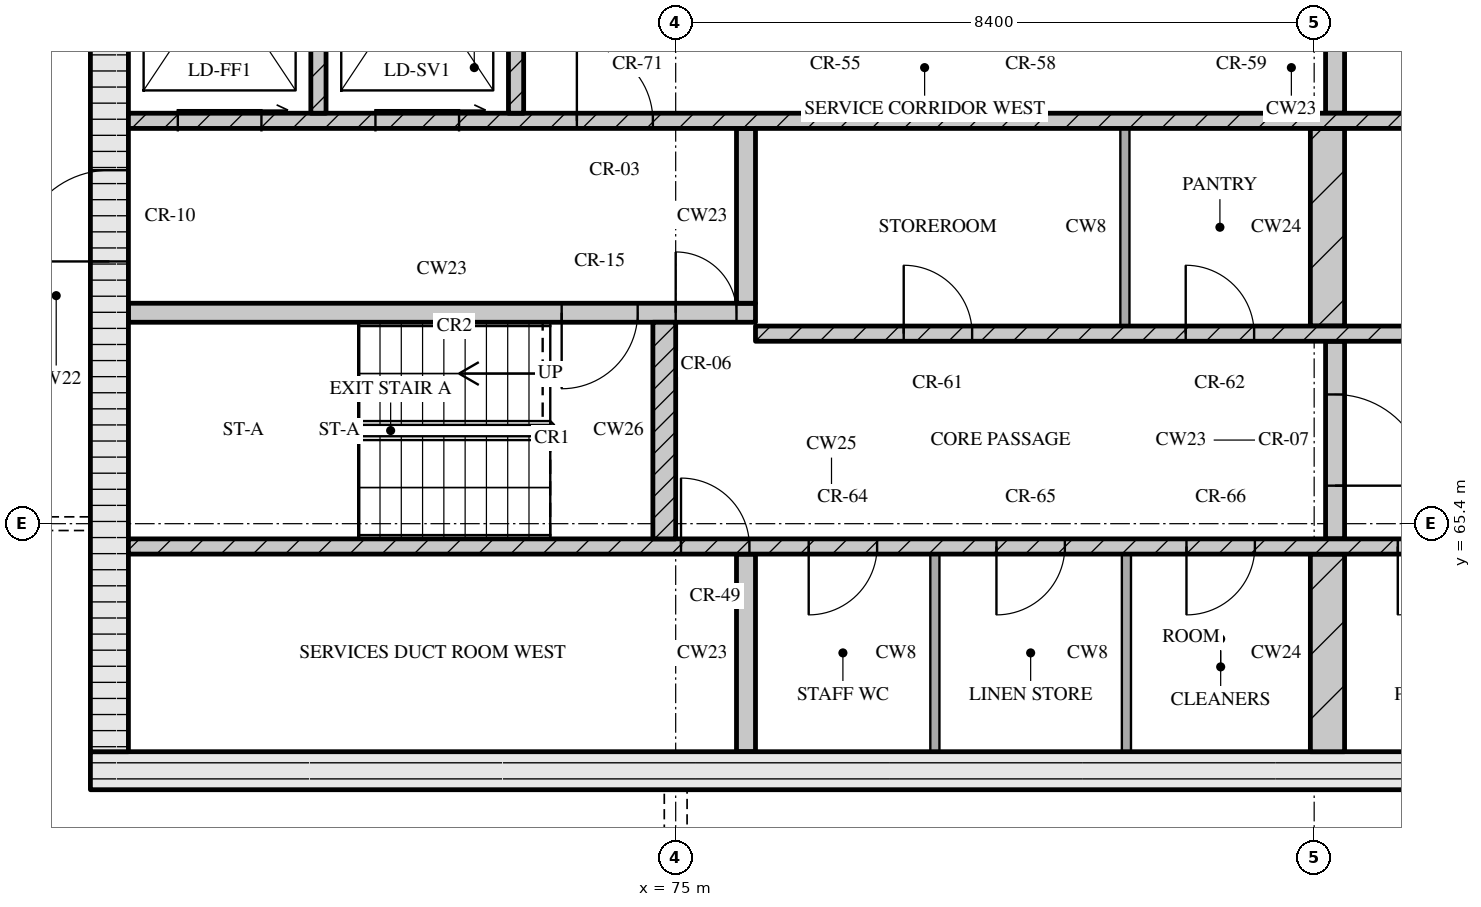
"""IFC4 building model, lengths in metres.
Left out: names, types, materials, properties, quantities, classifications, styles, units other than length and angle.
Written with IfcOpenShell. Run it as: python <this file> out.ifc"""

import sys

from ifc_helpers import new_model, si_unit, direction, frame, frame_2d, origin, place, context, subcontext, project, spatial, rectangle, extrude, element, fill, save


model = new_model("IFC4")
c1 = context("Model", 3, precision=1e-05, world=origin(), true_north=direction((0.0, 1.0)))
c2 = subcontext(c1, "Body", "Model", "MODEL_VIEW")
j1 = project(units=[si_unit("LENGTHUNIT", "METRE"), si_unit("PLANEANGLEUNIT", "RADIAN")], contexts=[c1])
p1 = place(None, origin())
s1 = spatial("IfcSite", under=j1, at=p1, CompositionType="ELEMENT")
p2 = place(p1, origin())
s2 = spatial("IfcBuilding", under=s1, at=p2, CompositionType="ELEMENT")
p3 = place(p2, frame((0.0, 0.0, 288.75)))
s3 = spatial("IfcBuildingStorey", under=s2, at=p3, CompositionType="ELEMENT", Elevation=288.75)
p4 = place(p3, frame((67.3, 62.15, 0.0), z_axis=(0.0, 0.0, 1.0), x_axis=(1.0, 0.0, 0.0)))
e1 = element("IfcWall", 1, at=p4, inside=s3, PredefinedType="SOLIDWALL", context=c2, shape_type="SweptSolid", body=[
    extrude(rectangle(XDim=40.6, YDim=0.5, at=frame_2d((20.3, 0.0))), origin(), (0.0, 0.0, 1.0), 3.32),
])
p5 = place(p4, frame((20.65, 0.0, 0.0)))
e2 = element("IfcOpeningElement", 2, at=p5, cuts=e1, PredefinedType="OPENING", context=c2, shape_type="SweptSolid", body=[
    extrude(rectangle(XDim=1.8, YDim=2.1, at=frame_2d((0.9, 1.05))), frame((0.0, 0.26, 0.0), z_axis=(0.0, -1.0, 0.0), x_axis=(1.0, 0.0, 0.0)), (0.0, 0.0, 1.0), 0.52),
])
p6 = place(p3, frame((67.55, 62.4, 0.0), z_axis=(0.0, 0.0, 1.0), x_axis=(0.0, 1.0, 0.0)))
e3 = element("IfcWall", 3, at=p6, inside=s3, PredefinedType="SOLIDWALL", context=c2, shape_type="SweptSolid", body=[
    extrude(rectangle(XDim=12.0, YDim=0.5, at=frame_2d((6.0, 0.0))), origin(), (0.0, 0.0, 1.0), 3.32),
])
p7 = place(p6, frame((6.45, 0.0, 0.0)))
e4 = element("IfcOpeningElement", 4, at=p7, cuts=e3, PredefinedType="OPENING", context=c2, shape_type="SweptSolid", body=[
    extrude(rectangle(XDim=1.2, YDim=2.1, at=frame_2d((0.6, 1.05))), frame((0.0, 0.26, 0.0), z_axis=(0.0, -1.0, 0.0), x_axis=(1.0, 0.0, 0.0)), (0.0, 0.0, 1.0), 0.52),
])
p8 = place(p3, frame((75.925, 62.4, 0.0), z_axis=(0.0, 0.0, 1.0), x_axis=(0.0, 1.0, 0.0)))
e5 = element("IfcWall", 5, at=p8, inside=s3, PredefinedType="SOLIDWALL", context=c2, shape_type="SweptSolid", body=[
    extrude(rectangle(XDim=2.6, YDim=0.25, at=frame_2d((1.3, 0.0))), origin(), (0.0, 0.0, 1.0), 3.32),
])
for number, where, z_axis, x_axis in (
    (6, (78.41, 62.4, 0.0), (0.0, 0.0, 1.0), (0.0, 1.0, 0.0)),
    (7, (80.93, 62.4, 0.0), (0.0, 0.0, 1.0), (0.0, 1.0, 0.0)),
):
    element("IfcWall", number, at=place(p3, frame(where, z_axis=z_axis, x_axis=x_axis)), inside=s3, PredefinedType="PARTITIONING", context=c2, shape_type="SweptSolid", body=[
        extrude(rectangle(XDim=2.6, YDim=0.12, at=frame_2d((1.3, 0.0))), origin(), (0.0, 0.0, 1.0), 3.32),
    ])
p9 = place(p3, frame((83.575, 62.4, 0.0), z_axis=(0.0, 0.0, 1.0), x_axis=(0.0, 1.0, 0.0)))
e8 = element("IfcWall", 8, at=p9, inside=s3, PredefinedType="SOLIDWALL", context=c2, shape_type="SweptSolid", body=[
    extrude(rectangle(XDim=2.6, YDim=0.45, at=frame_2d((1.3, 0.0))), origin(), (0.0, 0.0, 1.0), 3.32),
])
p10 = place(p3, frame((67.8, 65.1, 0.0), z_axis=(0.0, 0.0, 1.0), x_axis=(1.0, 0.0, 0.0)))
e9 = element("IfcWall", 9, at=p10, inside=s3, PredefinedType="SOLIDWALL", context=c2, shape_type="SweptSolid", body=[
    extrude(rectangle(XDim=18.5, YDim=0.2, at=frame_2d((9.25, 0.0))), origin(), (0.0, 0.0, 1.0), 3.32),
])
p11 = place(p10, frame((7.27, 0.0, 0.0)))
e10 = element("IfcOpeningElement", 10, at=p11, cuts=e9, PredefinedType="OPENING", context=c2, shape_type="SweptSolid", body=[
    extrude(rectangle(XDim=0.9, YDim=2.1, at=frame_2d((0.45, 1.05))), frame((0.0, 0.11, 0.0), z_axis=(0.0, -1.0, 0.0), x_axis=(1.0, 0.0, 0.0)), (0.0, 0.0, 1.0), 0.22),
])
p12 = place(p10, frame((8.95, 0.0, 0.0)))
e11 = element("IfcOpeningElement", 11, at=p12, cuts=e9, PredefinedType="OPENING", context=c2, shape_type="SweptSolid", body=[
    extrude(rectangle(XDim=0.9, YDim=2.1, at=frame_2d((0.45, 1.05))), frame((0.0, 0.11, 0.0), z_axis=(0.0, -1.0, 0.0), x_axis=(1.0, 0.0, 0.0)), (0.0, 0.0, 1.0), 0.22),
])
p13 = place(p10, frame((11.42, 0.0, 0.0)))
e12 = element("IfcOpeningElement", 12, at=p13, cuts=e9, PredefinedType="OPENING", context=c2, shape_type="SweptSolid", body=[
    extrude(rectangle(XDim=0.9, YDim=2.1, at=frame_2d((0.45, 1.05))), frame((0.0, 0.11, 0.0), z_axis=(0.0, -1.0, 0.0), x_axis=(1.0, 0.0, 0.0)), (0.0, 0.0, 1.0), 0.22),
])
p14 = place(p10, frame((13.92, 0.0, 0.0)))
e13 = element("IfcOpeningElement", 13, at=p14, cuts=e9, PredefinedType="OPENING", context=c2, shape_type="SweptSolid", body=[
    extrude(rectangle(XDim=0.9, YDim=2.1, at=frame_2d((0.45, 1.05))), frame((0.0, 0.11, 0.0), z_axis=(0.0, -1.0, 0.0), x_axis=(1.0, 0.0, 0.0)), (0.0, 0.0, 1.0), 0.22),
])
p15 = place(p10, frame((16.7, 0.0, 0.0)))
e14 = element("IfcOpeningElement", 14, at=p15, cuts=e9, PredefinedType="OPENING", context=c2, shape_type="SweptSolid", body=[
    extrude(rectangle(XDim=0.9, YDim=2.1, at=frame_2d((0.45, 1.05))), frame((0.0, 0.11, 0.0), z_axis=(0.0, -1.0, 0.0), x_axis=(1.0, 0.0, 0.0)), (0.0, 0.0, 1.0), 0.22),
])
p16 = place(p3, frame((74.85, 65.2, 0.0), z_axis=(0.0, 0.0, 1.0), x_axis=(0.0, 1.0, 0.0)))
e15 = element("IfcWall", 15, at=p16, inside=s3, PredefinedType="SOLIDWALL", context=c2, shape_type="SweptSolid", body=[
    extrude(rectangle(XDim=2.85, YDim=0.3, at=frame_2d((1.425, 0.0))), origin(), (0.0, 0.0, 1.0), 3.32),
])
p17 = place(p3, frame((83.675, 65.2, 0.0), z_axis=(0.0, 0.0, 1.0), x_axis=(0.0, 1.0, 0.0)))
e16 = element("IfcWall", 16, at=p17, inside=s3, PredefinedType="SOLIDWALL", context=c2, shape_type="SweptSolid", body=[
    extrude(rectangle(XDim=2.6, YDim=0.25, at=frame_2d((1.3, 0.0))), origin(), (0.0, 0.0, 1.0), 3.32),
])
p18 = place(p17, frame((0.7, 0.0, 0.0)))
e17 = element("IfcOpeningElement", 17, at=p18, cuts=e16, PredefinedType="OPENING", context=c2, shape_type="SweptSolid", body=[
    extrude(rectangle(XDim=1.2, YDim=2.1, at=frame_2d((0.6, 1.05))), frame((0.0, 0.135, 0.0), z_axis=(0.0, -1.0, 0.0), x_axis=(1.0, 0.0, 0.0)), (0.0, 0.0, 1.0), 0.27),
])
p19 = place(p3, frame((76.05, 67.9, 0.0), z_axis=(0.0, 0.0, 1.0), x_axis=(1.0, 0.0, 0.0)))
e18 = element("IfcWall", 18, at=p19, inside=s3, PredefinedType="SOLIDWALL", context=c2, shape_type="SweptSolid", body=[
    extrude(rectangle(XDim=23.1, YDim=0.2, at=frame_2d((11.55, 0.0))), origin(), (0.0, 0.0, 1.0), 3.32),
])
p20 = place(p19, frame((1.95, 0.0, 0.0)))
e19 = element("IfcOpeningElement", 19, at=p20, cuts=e18, PredefinedType="OPENING", context=c2, shape_type="SweptSolid", body=[
    extrude(rectangle(XDim=0.9, YDim=2.1, at=frame_2d((0.45, 1.05))), frame((0.0, 0.11, 0.0), z_axis=(0.0, -1.0, 0.0), x_axis=(1.0, 0.0, 0.0)), (0.0, 0.0, 1.0), 0.22),
])
p21 = place(p19, frame((5.66, 0.0, 0.0)))
e20 = element("IfcOpeningElement", 20, at=p21, cuts=e18, PredefinedType="OPENING", context=c2, shape_type="SweptSolid", body=[
    extrude(rectangle(XDim=0.9, YDim=2.1, at=frame_2d((0.45, 1.05))), frame((0.0, 0.11, 0.0), z_axis=(0.0, -1.0, 0.0), x_axis=(1.0, 0.0, 0.0)), (0.0, 0.0, 1.0), 0.22),
])
p22 = place(p19, frame((9.7, 0.0, 0.0)))
e21 = element("IfcOpeningElement", 21, at=p22, cuts=e18, PredefinedType="OPENING", context=c2, shape_type="SweptSolid", body=[
    extrude(rectangle(XDim=0.9, YDim=2.1, at=frame_2d((0.45, 1.05))), frame((0.0, 0.11, 0.0), z_axis=(0.0, -1.0, 0.0), x_axis=(1.0, 0.0, 0.0)), (0.0, 0.0, 1.0), 0.22),
])
p23 = place(p19, frame((13.55, 0.0, 0.0)))
e22 = element("IfcOpeningElement", 22, at=p23, cuts=e18, PredefinedType="OPENING", context=c2, shape_type="SweptSolid", body=[
    extrude(rectangle(XDim=1.0, YDim=2.1, at=frame_2d((0.5, 1.05))), frame((0.0, 0.11, 0.0), z_axis=(0.0, -1.0, 0.0), x_axis=(1.0, 0.0, 0.0)), (0.0, 0.0, 1.0), 0.22),
])
p24 = place(p19, frame((16.2, 0.0, 0.0)))
e23 = element("IfcOpeningElement", 23, at=p24, cuts=e18, PredefinedType="OPENING", context=c2, shape_type="SweptSolid", body=[
    extrude(rectangle(XDim=1.1, YDim=2.1, at=frame_2d((0.55, 1.05))), frame((0.0, 0.11, 0.0), z_axis=(0.0, -1.0, 0.0), x_axis=(1.0, 0.0, 0.0)), (0.0, 0.0, 1.0), 0.22),
])
p25 = place(p19, frame((18.7, 0.0, 0.0)))
e24 = element("IfcOpeningElement", 24, at=p25, cuts=e18, PredefinedType="OPENING", context=c2, shape_type="SweptSolid", body=[
    extrude(rectangle(XDim=1.1, YDim=2.1, at=frame_2d((0.55, 1.05))), frame((0.0, 0.11, 0.0), z_axis=(0.0, -1.0, 0.0), x_axis=(1.0, 0.0, 0.0)), (0.0, 0.0, 1.0), 0.22),
])
p26 = place(p19, frame((21.2, 0.0, 0.0)))
e25 = element("IfcOpeningElement", 25, at=p26, cuts=e18, PredefinedType="OPENING", context=c2, shape_type="SweptSolid", body=[
    extrude(rectangle(XDim=1.1, YDim=2.1, at=frame_2d((0.55, 1.05))), frame((0.0, 0.11, 0.0), z_axis=(0.0, -1.0, 0.0), x_axis=(1.0, 0.0, 0.0)), (0.0, 0.0, 1.0), 0.22),
])
p27 = place(p3, frame((80.91, 68.0, 0.0), z_axis=(0.0, 0.0, 1.0), x_axis=(0.0, 1.0, 0.0)))
e26 = element("IfcWall", 26, at=p27, inside=s3, PredefinedType="PARTITIONING", context=c2, shape_type="SweptSolid", body=[
    extrude(rectangle(XDim=2.6, YDim=0.12, at=frame_2d((1.3, 0.0))), origin(), (0.0, 0.0, 1.0), 3.32),
])
p28 = place(p3, frame((83.575, 68.0, 0.0), z_axis=(0.0, 0.0, 1.0), x_axis=(0.0, 1.0, 0.0)))
e27 = element("IfcWall", 27, at=p28, inside=s3, PredefinedType="SOLIDWALL", context=c2, shape_type="SweptSolid", body=[
    extrude(rectangle(XDim=2.6, YDim=0.45, at=frame_2d((1.3, 0.0))), origin(), (0.0, 0.0, 1.0), 3.32),
])
p29 = place(p3, frame((67.8, 68.175, 0.0), z_axis=(0.0, 0.0, 1.0), x_axis=(1.0, 0.0, 0.0)))
e28 = element("IfcWall", 28, at=p29, inside=s3, PredefinedType="SOLIDWALL", context=c2, shape_type="SweptSolid", body=[
    extrude(rectangle(XDim=8.25, YDim=0.25, at=frame_2d((4.125, 0.0))), origin(), (0.0, 0.0, 1.0), 3.32),
])
p30 = place(p29, frame((5.7, 0.0, 0.0)))
e29 = element("IfcOpeningElement", 29, at=p30, cuts=e28, PredefinedType="OPENING", context=c2, shape_type="SweptSolid", body=[
    extrude(rectangle(XDim=1.0, YDim=2.1, at=frame_2d((0.5, 1.05))), frame((0.0, 0.135, 0.0), z_axis=(0.0, -1.0, 0.0), x_axis=(1.0, 0.0, 0.0)), (0.0, 0.0, 1.0), 0.27),
])
p31 = place(p29, frame((7.2, 0.0, 0.0)))
e30 = element("IfcOpeningElement", 30, at=p31, cuts=e28, PredefinedType="OPENING", context=c2, shape_type="SweptSolid", body=[
    extrude(rectangle(XDim=0.8, YDim=2.1, at=frame_2d((0.4, 1.05))), frame((0.0, 0.135, 0.0), z_axis=(0.0, -1.0, 0.0), x_axis=(1.0, 0.0, 0.0)), (0.0, 0.0, 1.0), 0.27),
])
p32 = place(p3, frame((75.925, 68.3, 0.0), z_axis=(0.0, 0.0, 1.0), x_axis=(0.0, 1.0, 0.0)))
e31 = element("IfcWall", 31, at=p32, inside=s3, PredefinedType="SOLIDWALL", context=c2, shape_type="SweptSolid", body=[
    extrude(rectangle(XDim=2.3, YDim=0.25, at=frame_2d((1.15, 0.0))), origin(), (0.0, 0.0, 1.0), 3.32),
])
p33 = place(p3, frame((67.8, 70.7, 0.0), z_axis=(0.0, 0.0, 1.0), x_axis=(1.0, 0.0, 0.0)))
e32 = element("IfcWall", 32, at=p33, inside=s3, PredefinedType="SOLIDWALL", context=c2, shape_type="SweptSolid", body=[
    extrude(rectangle(XDim=39.6, YDim=0.2, at=frame_2d((19.8, 0.0))), origin(), (0.0, 0.0, 1.0), 3.32),
])
p34 = place(p33, frame((0.65, 0.0, 0.0)))
e33 = element("IfcOpeningElement", 33, at=p34, cuts=e32, PredefinedType="OPENING", context=c2, shape_type="SweptSolid", body=[
    extrude(rectangle(XDim=1.1, YDim=2.1, at=frame_2d((0.55, 1.05))), frame((0.0, 0.11, 0.0), z_axis=(0.0, -1.0, 0.0), x_axis=(1.0, 0.0, 0.0)), (0.0, 0.0, 1.0), 0.22),
])
p35 = place(p33, frame((3.25, 0.0, 0.0)))
e34 = element("IfcOpeningElement", 34, at=p35, cuts=e32, PredefinedType="OPENING", context=c2, shape_type="SweptSolid", body=[
    extrude(rectangle(XDim=1.1, YDim=2.1, at=frame_2d((0.55, 1.05))), frame((0.0, 0.11, 0.0), z_axis=(0.0, -1.0, 0.0), x_axis=(1.0, 0.0, 0.0)), (0.0, 0.0, 1.0), 0.22),
])
p36 = place(p33, frame((5.9, 0.0, 0.0)))
e35 = element("IfcOpeningElement", 35, at=p36, cuts=e32, PredefinedType="OPENING", context=c2, shape_type="SweptSolid", body=[
    extrude(rectangle(XDim=1.0, YDim=2.1, at=frame_2d((0.5, 1.05))), frame((0.0, 0.11, 0.0), z_axis=(0.0, -1.0, 0.0), x_axis=(1.0, 0.0, 0.0)), (0.0, 0.0, 1.0), 0.22),
])
p37 = place(p33, frame((21.7, 0.0, 0.0)))
e36 = element("IfcOpeningElement", 36, at=p37, cuts=e32, PredefinedType="OPENING", context=c2, shape_type="SweptSolid", body=[
    extrude(rectangle(XDim=1.0, YDim=2.1, at=frame_2d((0.5, 1.05))), frame((0.0, 0.11, 0.0), z_axis=(0.0, -1.0, 0.0), x_axis=(1.0, 0.0, 0.0)), (0.0, 0.0, 1.0), 0.22),
])
p38 = place(p33, frame((32.7, 0.0, 0.0)))
e37 = element("IfcOpeningElement", 37, at=p38, cuts=e32, PredefinedType="OPENING", context=c2, shape_type="SweptSolid", body=[
    extrude(rectangle(XDim=1.0, YDim=2.1, at=frame_2d((0.5, 1.05))), frame((0.0, 0.11, 0.0), z_axis=(0.0, -1.0, 0.0), x_axis=(1.0, 0.0, 0.0)), (0.0, 0.0, 1.0), 0.22),
])
p39 = place(p33, frame((35.25, 0.0, 0.0)))
e38 = element("IfcOpeningElement", 38, at=p39, cuts=e32, PredefinedType="OPENING", context=c2, shape_type="SweptSolid", body=[
    extrude(rectangle(XDim=1.1, YDim=2.1, at=frame_2d((0.55, 1.05))), frame((0.0, 0.11, 0.0), z_axis=(0.0, -1.0, 0.0), x_axis=(1.0, 0.0, 0.0)), (0.0, 0.0, 1.0), 0.22),
])
p40 = place(p33, frame((37.85, 0.0, 0.0)))
e39 = element("IfcOpeningElement", 39, at=p40, cuts=e32, PredefinedType="OPENING", context=c2, shape_type="SweptSolid", body=[
    extrude(rectangle(XDim=1.1, YDim=2.1, at=frame_2d((0.55, 1.05))), frame((0.0, 0.11, 0.0), z_axis=(0.0, -1.0, 0.0), x_axis=(1.0, 0.0, 0.0)), (0.0, 0.0, 1.0), 0.22),
])
p41 = place(p3, frame((70.3, 70.8, 0.0), z_axis=(0.0, 0.0, 1.0), x_axis=(0.0, 1.0, 0.0)))
e40 = element("IfcWall", 40, at=p41, inside=s3, PredefinedType="SOLIDWALL", context=c2, shape_type="SweptSolid", body=[
    extrude(rectangle(XDim=3.6, YDim=0.2, at=frame_2d((1.8, 0.0))), origin(), (0.0, 0.0, 1.0), 3.32),
])
p42 = place(p3, frame((72.9, 70.8, 0.0), z_axis=(0.0, 0.0, 1.0), x_axis=(0.0, 1.0, 0.0)))
e41 = element("IfcWall", 41, at=p42, inside=s3, PredefinedType="SOLIDWALL", context=c2, shape_type="SweptSolid", body=[
    extrude(rectangle(XDim=1.2, YDim=0.2, at=frame_2d((0.6, 0.0))), origin(), (0.0, 0.0, 1.0), 3.32),
])
p43 = place(p3, frame((83.675, 70.8, 0.0), z_axis=(0.0, 0.0, 1.0), x_axis=(0.0, 1.0, 0.0)))
e42 = element("IfcWall", 42, at=p43, inside=s3, PredefinedType="SOLIDWALL", context=c2, shape_type="SweptSolid", body=[
    extrude(rectangle(XDim=1.2, YDim=0.25, at=frame_2d((0.6, 0.0))), origin(), (0.0, 0.0, 1.0), 3.32),
])
p44 = place(p11, origin())
e43 = element("IfcDoor", 43, at=p44, inside=s3, OperationType="SINGLE_SWING_LEFT", PredefinedType="DOOR", context=c2, shape_type="SweptSolid", body=[
    extrude(rectangle(XDim=0.9, YDim=2.1, at=frame_2d((0.45, 1.05))), frame((0.0, 0.025, 0.0), z_axis=(0.0, -1.0, 0.0), x_axis=(1.0, 0.0, 0.0)), (0.0, 0.0, 1.0), 0.05),
])
fill(e10, e43)
p45 = place(p12, origin())
e44 = element("IfcDoor", 44, at=p45, inside=s3, OperationType="SINGLE_SWING_RIGHT", PredefinedType="DOOR", context=c2, shape_type="SweptSolid", body=[
    extrude(rectangle(XDim=0.9, YDim=2.1, at=frame_2d((0.45, 1.05))), frame((0.0, 0.025, 0.0), z_axis=(0.0, -1.0, 0.0), x_axis=(1.0, 0.0, 0.0)), (0.0, 0.0, 1.0), 0.05),
])
fill(e11, e44)
p46 = place(p13, origin())
e45 = element("IfcDoor", 45, at=p46, inside=s3, OperationType="SINGLE_SWING_RIGHT", PredefinedType="DOOR", context=c2, shape_type="SweptSolid", body=[
    extrude(rectangle(XDim=0.9, YDim=2.1, at=frame_2d((0.45, 1.05))), frame((0.0, 0.025, 0.0), z_axis=(0.0, -1.0, 0.0), x_axis=(1.0, 0.0, 0.0)), (0.0, 0.0, 1.0), 0.05),
])
fill(e12, e45)
p47 = place(p14, origin())
e46 = element("IfcDoor", 46, at=p47, inside=s3, OperationType="SINGLE_SWING_RIGHT", PredefinedType="DOOR", context=c2, shape_type="SweptSolid", body=[
    extrude(rectangle(XDim=0.9, YDim=2.1, at=frame_2d((0.45, 1.05))), frame((0.0, 0.025, 0.0), z_axis=(0.0, -1.0, 0.0), x_axis=(1.0, 0.0, 0.0)), (0.0, 0.0, 1.0), 0.05),
])
fill(e13, e46)
p48 = place(p15, origin())
e47 = element("IfcDoor", 47, at=p48, inside=s3, OperationType="SINGLE_SWING_RIGHT", PredefinedType="DOOR", context=c2, shape_type="SweptSolid", body=[
    extrude(rectangle(XDim=0.9, YDim=2.1, at=frame_2d((0.45, 1.05))), frame((0.0, 0.025, 0.0), z_axis=(0.0, -1.0, 0.0), x_axis=(1.0, 0.0, 0.0)), (0.0, 0.0, 1.0), 0.05),
])
fill(e14, e47)
p49 = place(p18, origin())
e48 = element("IfcDoor", 48, at=p49, inside=s3, OperationType="SINGLE_SWING_RIGHT", PredefinedType="DOOR", context=c2, shape_type="SweptSolid", body=[
    extrude(rectangle(XDim=1.2, YDim=2.1, at=frame_2d((0.6, 1.05))), frame((0.0, 0.025, 0.0), z_axis=(0.0, -1.0, 0.0), x_axis=(1.0, 0.0, 0.0)), (0.0, 0.0, 1.0), 0.05),
])
fill(e17, e48)
p50 = place(p20, origin())
e49 = element("IfcDoor", 49, at=p50, inside=s3, OperationType="SINGLE_SWING_LEFT", PredefinedType="DOOR", context=c2, shape_type="SweptSolid", body=[
    extrude(rectangle(XDim=0.9, YDim=2.1, at=frame_2d((0.45, 1.05))), frame((0.0, 0.025, 0.0), z_axis=(0.0, -1.0, 0.0), x_axis=(1.0, 0.0, 0.0)), (0.0, 0.0, 1.0), 0.05),
])
fill(e19, e49)
p51 = place(p21, origin())
e50 = element("IfcDoor", 50, at=p51, inside=s3, OperationType="SINGLE_SWING_LEFT", PredefinedType="DOOR", context=c2, shape_type="SweptSolid", body=[
    extrude(rectangle(XDim=0.9, YDim=2.1, at=frame_2d((0.45, 1.05))), frame((0.0, 0.025, 0.0), z_axis=(0.0, -1.0, 0.0), x_axis=(1.0, 0.0, 0.0)), (0.0, 0.0, 1.0), 0.05),
])
fill(e20, e50)
p52 = place(p30, origin())
e51 = element("IfcDoor", 51, at=p52, inside=s3, OperationType="SINGLE_SWING_RIGHT", PredefinedType="DOOR", context=c2, shape_type="SweptSolid", body=[
    extrude(rectangle(XDim=1.0, YDim=2.1, at=frame_2d((0.5, 1.05))), frame((0.0, 0.025, 0.0), z_axis=(0.0, -1.0, 0.0), x_axis=(1.0, 0.0, 0.0)), (0.0, 0.0, 1.0), 0.05),
])
fill(e29, e51)
p53 = place(p31, origin())
e52 = element("IfcDoor", 52, at=p53, inside=s3, OperationType="SINGLE_SWING_LEFT", PredefinedType="DOOR", context=c2, shape_type="SweptSolid", body=[
    extrude(rectangle(XDim=0.8, YDim=2.1, at=frame_2d((0.4, 1.05))), frame((0.0, 0.025, 0.0), z_axis=(0.0, -1.0, 0.0), x_axis=(1.0, 0.0, 0.0)), (0.0, 0.0, 1.0), 0.05),
])
fill(e30, e52)
p54 = place(p7, origin())
e53 = element("IfcDoor", 53, at=p54, inside=s3, OperationType="SINGLE_SWING_LEFT", PredefinedType="DOOR", context=c2, shape_type="SweptSolid", body=[
    extrude(rectangle(XDim=1.2, YDim=2.1, at=frame_2d((0.6, 1.05))), frame((0.0, 0.025, 0.0), z_axis=(0.0, -1.0, 0.0), x_axis=(1.0, 0.0, 0.0)), (0.0, 0.0, 1.0), 0.05),
])
fill(e4, e53)
p55 = place(p34, origin())
e54 = element("IfcDoor", 54, at=p55, inside=s3, OperationType="SLIDING_TO_RIGHT", PredefinedType="DOOR", context=c2, shape_type="SweptSolid", body=[
    extrude(rectangle(XDim=1.1, YDim=2.1, at=frame_2d((0.55, 1.05))), frame((0.0, 0.025, 0.0), z_axis=(0.0, -1.0, 0.0), x_axis=(1.0, 0.0, 0.0)), (0.0, 0.0, 1.0), 0.05),
])
fill(e33, e54)
p56 = place(p35, origin())
e55 = element("IfcDoor", 55, at=p56, inside=s3, OperationType="SLIDING_TO_RIGHT", PredefinedType="DOOR", context=c2, shape_type="SweptSolid", body=[
    extrude(rectangle(XDim=1.1, YDim=2.1, at=frame_2d((0.55, 1.05))), frame((0.0, 0.025, 0.0), z_axis=(0.0, -1.0, 0.0), x_axis=(1.0, 0.0, 0.0)), (0.0, 0.0, 1.0), 0.05),
])
fill(e34, e55)
p57 = place(p36, origin())
e56 = element("IfcDoor", 56, at=p57, inside=s3, OperationType="SINGLE_SWING_LEFT", PredefinedType="DOOR", context=c2, shape_type="SweptSolid", body=[
    extrude(rectangle(XDim=1.0, YDim=2.1, at=frame_2d((0.5, 1.05))), frame((0.0, 0.025, 0.0), z_axis=(0.0, -1.0, 0.0), x_axis=(1.0, 0.0, 0.0)), (0.0, 0.0, 1.0), 0.05),
])
fill(e35, e56)
save(model, sys.argv[1])
